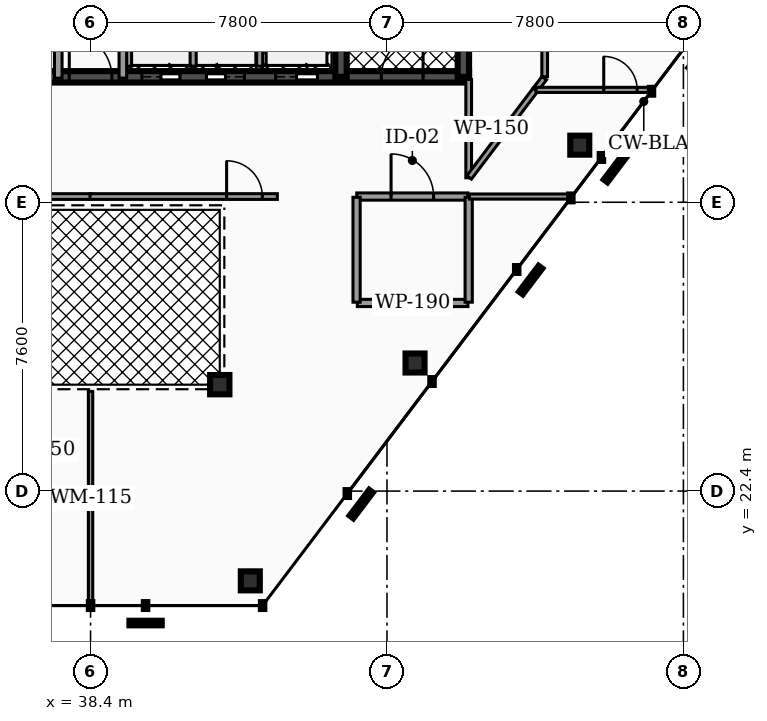
"""IFC4 building model, lengths in metres.
Left out: names, types, materials, properties, quantities, classifications, styles, units other than length and angle.
Written with IfcOpenShell. Run it as: python <this file> out.ifc"""

import sys

from ifc_helpers import new_model, si_unit, direction, frame, frame_2d, origin, origin_2d, place, context, subcontext, project, spatial, rectangle, hollow_rectangle, hollow_circle, extrude, element, fill, save


model = new_model("IFC4")
c1 = context("Model", 3, precision=1e-05, world=origin(), true_north=direction((0.0, 1.0)))
c2 = subcontext(c1, "Body", "Model", "MODEL_VIEW")
j1 = project(units=[si_unit("LENGTHUNIT", "METRE"), si_unit("PLANEANGLEUNIT", "RADIAN")], contexts=[c1])
p1 = place(None, origin())
s1 = spatial("IfcSite", under=j1, at=p1, CompositionType="ELEMENT")
p2 = place(p1, origin())
s2 = spatial("IfcBuilding", under=s1, at=p2, CompositionType="ELEMENT")
p3 = place(p2, frame((0.0, 0.0, 272.0)))
s3 = spatial("IfcBuildingStorey", under=s2, at=p3, CompositionType="ELEMENT", Elevation=272.0)
p4 = place(p3, frame((28.5, 33.3, 0.0), z_axis=(0.0, 0.0, 1.0), x_axis=(1.0, 0.0, 0.0)))
e1 = element("IfcWall", 1, at=p4, inside=s3, PredefinedType="SHEAR", context=c2, shape_type="SweptSolid", body=[
    extrude(rectangle(XDim=19.86, YDim=0.3, at=frame_2d((9.93, 0.0))), origin(), (0.0, 0.0, 1.0), 3.18),
])
p5 = place(p4, frame((3.93, 0.0, 0.0)))
e2 = element("IfcOpeningElement", 2, at=p5, cuts=e1, PredefinedType="OPENING", context=c2, shape_type="SweptSolid", body=[
    extrude(rectangle(XDim=1.1, YDim=2.15, at=frame_2d((0.55, 1.075))), frame((0.0, 0.16, 0.0), z_axis=(0.0, -1.0, 0.0), x_axis=(1.0, 0.0, 0.0)), (0.0, 0.0, 1.0), 0.32),
])
p6 = place(p4, frame((14.77, 0.0, 0.0)))
e3 = element("IfcOpeningElement", 3, at=p6, cuts=e1, PredefinedType="OPENING", context=c2, shape_type="SweptSolid", body=[
    extrude(rectangle(XDim=1.1, YDim=2.15, at=frame_2d((0.55, 1.075))), frame((0.0, 0.16, 0.0), z_axis=(0.0, -1.0, 0.0), x_axis=(1.0, 0.0, 0.0)), (0.0, 0.0, 1.0), 0.32),
])
p7 = place(p4, frame((11.25, 0.0, 0.0)))
e4 = element("IfcOpeningElement", 4, at=p7, cuts=e1, PredefinedType="OPENING", context=c2, shape_type="SweptSolid", body=[
    extrude(rectangle(XDim=1.0, YDim=2.1, at=frame_2d((0.5, 1.05))), frame((0.0, 0.16, 0.0), z_axis=(0.0, -1.0, 0.0), x_axis=(1.0, 0.0, 0.0)), (0.0, 0.0, 1.0), 0.32),
])
p8 = place(p4, frame((12.95, 0.0, 0.0)))
e5 = element("IfcOpeningElement", 5, at=p8, cuts=e1, PredefinedType="OPENING", context=c2, shape_type="SweptSolid", body=[
    extrude(rectangle(XDim=1.0, YDim=2.1, at=frame_2d((0.5, 1.05))), frame((0.0, 0.16, 0.0), z_axis=(0.0, -1.0, 0.0), x_axis=(1.0, 0.0, 0.0)), (0.0, 0.0, 1.0), 0.32),
])
p9 = place(p4, frame((5.85, 0.0, 0.0)))
e6 = element("IfcOpeningElement", 6, at=p9, cuts=e1, PredefinedType="OPENING", context=c2, shape_type="SweptSolid", body=[
    extrude(rectangle(XDim=1.0, YDim=2.1, at=frame_2d((0.5, 1.05))), frame((0.0, 0.16, 0.0), z_axis=(0.0, -1.0, 0.0), x_axis=(1.0, 0.0, 0.0)), (0.0, 0.0, 1.0), 0.32),
])
p10 = place(p4, frame((1.21, 0.0, 0.0)))
e7 = element("IfcOpeningElement", 7, at=p10, cuts=e1, PredefinedType="OPENING", context=c2, shape_type="SweptSolid", body=[
    extrude(rectangle(XDim=1.1, YDim=2.2, at=frame_2d((0.55, 1.1))), frame((0.0, 0.16, 0.0), z_axis=(0.0, -1.0, 0.0), x_axis=(1.0, 0.0, 0.0)), (0.0, 0.0, 1.0), 0.32),
])
p11 = place(p4, frame((9.34, 0.0, 0.0)))
e8 = element("IfcOpeningElement", 8, at=p11, cuts=e1, PredefinedType="OPENING", context=c2, shape_type="SweptSolid", body=[
    extrude(rectangle(XDim=1.12, YDim=2.05, at=frame_2d((0.56, 1.025))), frame((0.0, 0.16, 0.0), z_axis=(0.0, -1.0, 0.0), x_axis=(1.0, 0.0, 0.0)), (0.0, 0.0, 1.0), 0.32),
])
p12 = place(p4, frame((17.55, 0.0, 0.0)))
e9 = element("IfcOpeningElement", 9, at=p12, cuts=e1, PredefinedType="OPENING", context=c2, shape_type="SweptSolid", body=[
    extrude(rectangle(XDim=1.1, YDim=2.2, at=frame_2d((0.55, 1.1))), frame((0.0, 0.16, 0.0), z_axis=(0.0, -1.0, 0.0), x_axis=(1.0, 0.0, 0.0)), (0.0, 0.0, 1.0), 0.32),
])
for number, where, z_axis, x_axis in (
    (10, (44.99, 33.3, 0.0), (0.0, 0.0, 1.0), (0.0, 1.0, 0.0)),
    (11, (48.21, 33.3, 0.0), (0.0, 0.0, 1.0), (0.0, 1.0, 0.0)),
):
    element("IfcWall", number, at=place(p3, frame(where, z_axis=z_axis, x_axis=x_axis)), inside=s3, PredefinedType="SHEAR", context=c2, shape_type="SweptSolid", body=[
        extrude(rectangle(XDim=10.1, YDim=0.3, at=frame_2d((5.05, 0.0))), origin(), (0.0, 0.0, 1.0), 3.18),
    ])
for number, where, z_axis, x_axis in (
    (12, (42.604, 20.038, 0.0), (0.0, 0.0, 1.0), (1.0, 0.0, 0.0)),
    (13, (46.938, 25.77, 0.0), (0.0, 0.0, 1.0), (1.0, 0.0, 0.0)),
    (14, (51.273, 31.502, 0.0), (0.0, 0.0, 1.0), (1.0, 0.0, 0.0)),
):
    element("IfcColumn", number, at=place(p3, frame(where, z_axis=z_axis, x_axis=x_axis)), inside=s3, PredefinedType="COLUMN", context=c2, shape_type="SweptSolid", body=[
        extrude(hollow_rectangle(XDim=0.5, YDim=0.5, WallThickness=0.025, at=origin_2d()), origin(), (0.0, 0.0, 1.0), 3.18),
    ])
p13 = place(p3, frame((41.8, 25.2, 0.0), z_axis=(0.0, 0.0, 1.0), x_axis=(1.0, 0.0, 0.0)))
e15 = element("IfcColumn", 15, at=p13, inside=s3, PredefinedType="COLUMN", context=c2, shape_type="SweptSolid", body=[
    extrude(hollow_circle(Radius=0.254, WallThickness=0.02, at=origin_2d()), origin(), (0.0, 0.0, 1.0), 3.18),
])
p14 = place(p3, frame((42.85, 33.58, 0.0), z_axis=(0.0, 0.0, 1.0), x_axis=(0.0, 1.0, 0.0)))
e16 = element("IfcWall", 16, at=p14, inside=s3, PredefinedType="SOLIDWALL", context=c2, shape_type="SweptSolid", body=[
    extrude(rectangle(XDim=2.45, YDim=0.16, at=frame_2d((1.225, 0.0))), origin(), (0.0, 0.0, 1.0), 3.18),
])
for number, where, z_axis, x_axis in (
    (17, (39.4, 33.58, 0.0), (0.0, 0.0, 1.0), (0.0, 1.0, 0.0)),
    (18, (41.1, 33.58, 0.0), (0.0, 0.0, 1.0), (0.0, 1.0, 0.0)),
):
    element("IfcWall", number, at=place(p3, frame(where, z_axis=z_axis, x_axis=x_axis)), inside=s3, PredefinedType="SOLIDWALL", context=c2, shape_type="SweptSolid", body=[
        extrude(rectangle(XDim=2.25, YDim=0.16, at=frame_2d((1.125, 0.0))), origin(), (0.0, 0.0, 1.0), 3.18),
    ])
p15 = place(p3, frame((37.55, 33.265, 0.0), z_axis=(0.0, 0.0, 1.0), x_axis=(0.0, 1.0, 0.0)))
e19 = element("IfcWall", 19, at=p15, inside=s3, PredefinedType="PARTITIONING", context=c2, shape_type="SweptSolid", body=[
    extrude(rectangle(XDim=3.615, YDim=0.2, at=frame_2d((1.808, 0.0))), origin(), (0.0, 0.0, 1.0), 2.235),
])
p16 = place(p15, frame((1.367, 0.0, 0.0)))
e20 = element("IfcOpeningElement", 20, at=p16, cuts=e19, PredefinedType="OPENING", context=c2, shape_type="SweptSolid", body=[
    extrude(rectangle(XDim=0.88, YDim=2.05, at=frame_2d((0.44, 1.025))), frame((0.0, 0.11, 0.0), z_axis=(0.0, -1.0, 0.0), x_axis=(1.0, 0.0, 0.0)), (0.0, 0.0, 1.0), 0.22),
])
p17 = place(p3, frame((39.25, 33.265, 0.0), z_axis=(0.0, 0.0, 1.0), x_axis=(0.0, 1.0, 0.0)))
e21 = element("IfcWall", 21, at=p17, inside=s3, PredefinedType="PARTITIONING", context=c2, shape_type="SweptSolid", body=[
    extrude(rectangle(XDim=3.615, YDim=0.2, at=frame_2d((1.808, 0.0))), origin(), (0.0, 0.0, 1.0), 2.235),
])
p18 = place(p3, frame((45.405, 30.15, 0.0), z_axis=(0.0, 0.0, 1.0), x_axis=(1.0, 0.0, 0.0)))
e22 = element("IfcWall", 22, at=p18, inside=s3, PredefinedType="PARTITIONING", context=c2, shape_type="SweptSolid", body=[
    extrude(rectangle(XDim=2.925, YDim=0.19, at=frame_2d((1.462, 0.0))), origin(), (0.0, 0.0, 1.0), 2.235),
])
p19 = place(p18, frame((0.903, 0.0, 0.0)))
e23 = element("IfcOpeningElement", 23, at=p19, cuts=e22, PredefinedType="OPENING", context=c2, shape_type="SweptSolid", body=[
    extrude(rectangle(XDim=1.12, YDim=2.05, at=frame_2d((0.56, 1.025))), frame((0.0, 0.105, 0.0), z_axis=(0.0, -1.0, 0.0), x_axis=(1.0, 0.0, 0.0)), (0.0, 0.0, 1.0), 0.21),
])
p20 = place(p3, frame((48.35, 30.643, 0.0), z_axis=(0.0, 0.0, 1.0), x_axis=(0.0, 1.0, 0.0)))
e24 = element("IfcWall", 24, at=p20, inside=s3, PredefinedType="PARTITIONING", context=c2, shape_type="SweptSolid", body=[
    extrude(rectangle(XDim=2.587, YDim=0.15, at=frame_2d((1.294, 0.0))), origin(), (0.0, 0.0, 1.0), 2.235),
])
p21 = place(p3, frame((33.485, 30.15, 0.0), z_axis=(0.0, 0.0, 1.0), x_axis=(1.0, 0.0, 0.0)))
e25 = element("IfcWall", 25, at=p21, inside=s3, PredefinedType="PARTITIONING", context=c2, shape_type="SweptSolid", body=[
    extrude(rectangle(XDim=4.93, YDim=0.15, at=frame_2d((2.465, 0.0))), origin(), (0.0, 0.0, 1.0), 2.235),
])
p22 = place(p21, frame((0.395, 0.0, 0.0)))
e26 = element("IfcOpeningElement", 26, at=p22, cuts=e25, PredefinedType="OPENING", context=c2, shape_type="SweptSolid", body=[
    extrude(rectangle(XDim=0.94, YDim=2.05, at=frame_2d((0.47, 1.025))), frame((0.0, 0.085, 0.0), z_axis=(0.0, -1.0, 0.0), x_axis=(1.0, 0.0, 0.0)), (0.0, 0.0, 1.0), 0.17),
])
p23 = place(p3, frame((38.385, 30.15, 0.0), z_axis=(0.0, 0.0, 1.0), x_axis=(1.0, 0.0, 0.0)))
e27 = element("IfcWall", 27, at=p23, inside=s3, PredefinedType="PARTITIONING", context=c2, shape_type="SweptSolid", body=[
    extrude(rectangle(XDim=4.93, YDim=0.15, at=frame_2d((2.465, 0.0))), origin(), (0.0, 0.0, 1.0), 2.235),
])
p24 = place(p23, frame((3.595, 0.0, 0.0)))
e28 = element("IfcOpeningElement", 28, at=p24, cuts=e27, PredefinedType="OPENING", context=c2, shape_type="SweptSolid", body=[
    extrude(rectangle(XDim=0.94, YDim=2.05, at=frame_2d((0.47, 1.025))), frame((0.0, 0.085, 0.0), z_axis=(0.0, -1.0, 0.0), x_axis=(1.0, 0.0, 0.0)), (0.0, 0.0, 1.0), 0.17),
])
p25 = place(p3, frame((45.42, 27.35, 0.0), z_axis=(0.0, 0.0, 1.0), x_axis=(1.0, 0.0, 0.0)))
e29 = element("IfcWall", 29, at=p25, inside=s3, PredefinedType="PARTITIONING", context=c2, shape_type="SweptSolid", body=[
    extrude(rectangle(XDim=2.91, YDim=0.19, at=frame_2d((1.455, 0.0))), origin(), (0.0, 0.0, 1.0), 2.235),
])
for number, where, z_axis, x_axis in (
    (30, (45.4, 27.37, 0.0), (0.0, 0.0, 1.0), (0.0, 1.0, 0.0)),
    (31, (48.35, 27.37, 0.0), (0.0, 0.0, 1.0), (0.0, 1.0, 0.0)),
):
    element("IfcWall", number, at=place(p3, frame(where, z_axis=z_axis, x_axis=x_axis)), inside=s3, PredefinedType="PARTITIONING", context=c2, shape_type="SweptSolid", body=[
        extrude(rectangle(XDim=2.76, YDim=0.19, at=frame_2d((1.38, 0.0))), origin(), (0.0, 0.0, 1.0), 2.235),
    ])
p26 = place(p3, frame((50.35, 33.302, 0.0), z_axis=(0.0, 0.0, 1.0), x_axis=(0.0, 1.0, 0.0)))
e32 = element("IfcWall", 32, at=p26, inside=s3, PredefinedType="PARTITIONING", context=c2, shape_type="SweptSolid", body=[
    extrude(rectangle(XDim=10.248, YDim=0.15, at=frame_2d((5.124, 0.0))), origin(), (0.0, 0.0, 1.0), 2.235),
])
p27 = place(p26, frame((4.654, 0.0, 0.0)))
e33 = element("IfcOpeningElement", 33, at=p27, cuts=e32, PredefinedType="OPENING", context=c2, shape_type="SweptSolid", body=[
    extrude(rectangle(XDim=0.94, YDim=2.05, at=frame_2d((0.47, 1.025))), frame((0.0, 0.085, 0.0), z_axis=(0.0, -1.0, 0.0), x_axis=(1.0, 0.0, 0.0)), (0.0, 0.0, 1.0), 0.17),
])
p28 = place(p3, frame((50.107, 32.96, 0.0), z_axis=(0.0, 0.0, 1.0), x_axis=(0.602950173728, 0.797778846549, 0.0)))
e34 = element("IfcWall", 34, at=p28, inside=s3, PredefinedType="PARTITIONING", context=c2, shape_type="SweptSolid", body=[
    extrude(rectangle(XDim=0.384, YDim=0.15, at=frame_2d((0.192, 0.0))), origin(), (0.0, 0.0, 1.0), 2.235),
])
p29 = place(p3, frame((48.362, 30.654, 0.0), z_axis=(0.0, 0.0, 1.0), x_axis=(0.603189668488, 0.79759778324, 0.0)))
e35 = element("IfcWall", 35, at=p29, inside=s3, PredefinedType="PARTITIONING", context=c2, shape_type="SweptSolid", body=[
    extrude(rectangle(XDim=2.886, YDim=0.15, at=frame_2d((1.443, 0.0))), origin(), (0.0, 0.0, 1.0), 2.235),
])
p30 = place(p3, frame((38.4, 19.403, 0.0), z_axis=(0.0, 0.0, 1.0), x_axis=(0.0, 1.0, 0.0)))
e36 = element("IfcWall", 36, at=p30, inside=s3, PredefinedType="MOVABLE", context=c2, shape_type="SweptSolid", body=[
    extrude(rectangle(XDim=5.617, YDim=0.115, at=frame_2d((2.809, 0.0))), origin(), (0.0, 0.0, 1.0), 2.235),
])
p31 = place(p3, frame((48.37, 30.15, 0.0), z_axis=(0.0, 0.0, 1.0), x_axis=(1.0, 0.0, 0.0)))
e37 = element("IfcWall", 37, at=p31, inside=s3, PredefinedType="PARTITIONING", context=c2, shape_type="SweptSolid", body=[
    extrude(rectangle(XDim=2.68, YDim=0.135, at=frame_2d((1.34, 0.0))), origin(), (0.0, 0.0, 1.0), 2.235),
])
p32 = place(p3, frame((50.124, 32.956, 0.0), z_axis=(0.0, 0.0, 1.0), x_axis=(1.0, 0.0, 0.0)))
e38 = element("IfcWall", 38, at=p32, inside=s3, PredefinedType="PARTITIONING", context=c2, shape_type="SweptSolid", body=[
    extrude(rectangle(XDim=3.049, YDim=0.135, at=frame_2d((1.525, 0.0))), origin(), (0.0, 0.0, 1.0), 2.235),
])
p33 = place(p32, frame((1.78, 0.0, 0.0)))
e39 = element("IfcOpeningElement", 39, at=p33, cuts=e38, PredefinedType="OPENING", context=c2, shape_type="SweptSolid", body=[
    extrude(rectangle(XDim=0.88, YDim=2.05, at=frame_2d((0.44, 1.025))), frame((0.0, 0.077, 0.0), z_axis=(0.0, -1.0, 0.0), x_axis=(1.0, 0.0, 0.0)), (0.0, 0.0, 1.0), 0.155),
])
p34 = place(p6, origin())
e40 = element("IfcDoor", 40, at=p34, inside=s3, OperationType="SLIDING_TO_RIGHT", PredefinedType="DOOR", context=c2, shape_type="SweptSolid", body=[
    extrude(rectangle(XDim=1.1, YDim=2.15, at=frame_2d((0.55, 1.075))), frame((0.0, 0.025, 0.0), z_axis=(0.0, -1.0, 0.0), x_axis=(1.0, 0.0, 0.0)), (0.0, 0.0, 1.0), 0.05),
])
fill(e3, e40)
p35 = place(p7, origin())
e41 = element("IfcDoor", 41, at=p35, inside=s3, OperationType="SLIDING_TO_RIGHT", PredefinedType="DOOR", context=c2, shape_type="SweptSolid", body=[
    extrude(rectangle(XDim=1.0, YDim=2.1, at=frame_2d((0.5, 1.05))), frame((0.0, 0.025, 0.0), z_axis=(0.0, -1.0, 0.0), x_axis=(1.0, 0.0, 0.0)), (0.0, 0.0, 1.0), 0.05),
])
fill(e4, e41)
p36 = place(p8, origin())
e42 = element("IfcDoor", 42, at=p36, inside=s3, OperationType="SLIDING_TO_LEFT", PredefinedType="DOOR", context=c2, shape_type="SweptSolid", body=[
    extrude(rectangle(XDim=1.0, YDim=2.1, at=frame_2d((0.5, 1.05))), frame((0.0, 0.025, 0.0), z_axis=(0.0, -1.0, 0.0), x_axis=(1.0, 0.0, 0.0)), (0.0, 0.0, 1.0), 0.05),
])
fill(e5, e42)
p37 = place(p11, origin())
e43 = element("IfcDoor", 43, at=p37, inside=s3, OperationType="SINGLE_SWING_LEFT", PredefinedType="DOOR", context=c2, shape_type="SweptSolid", body=[
    extrude(rectangle(XDim=1.12, YDim=2.05, at=frame_2d((0.56, 1.025))), frame((0.0, 0.025, 0.0), z_axis=(0.0, -1.0, 0.0), x_axis=(1.0, 0.0, 0.0)), (0.0, 0.0, 1.0), 0.05),
])
fill(e8, e43)
p38 = place(p12, origin())
e44 = element("IfcDoor", 44, at=p38, inside=s3, OperationType="SINGLE_SWING_RIGHT", PredefinedType="DOOR", context=c2, shape_type="SweptSolid", body=[
    extrude(rectangle(XDim=1.1, YDim=2.2, at=frame_2d((0.55, 1.1))), frame((0.0, 0.025, 0.0), z_axis=(0.0, -1.0, 0.0), x_axis=(1.0, 0.0, 0.0)), (0.0, 0.0, 1.0), 0.05),
])
fill(e9, e44)
p39 = place(p19, origin())
e45 = element("IfcDoor", 45, at=p39, inside=s3, OperationType="SINGLE_SWING_LEFT", PredefinedType="DOOR", context=c2, shape_type="SweptSolid", body=[
    extrude(rectangle(XDim=1.12, YDim=2.05, at=frame_2d((0.56, 1.025))), frame((0.0, 0.025, 0.0), z_axis=(0.0, -1.0, 0.0), x_axis=(1.0, 0.0, 0.0)), (0.0, 0.0, 1.0), 0.05),
])
fill(e23, e45)
p40 = place(p24, origin())
e46 = element("IfcDoor", 46, at=p40, inside=s3, OperationType="SINGLE_SWING_LEFT", PredefinedType="DOOR", context=c2, shape_type="SweptSolid", body=[
    extrude(rectangle(XDim=0.94, YDim=2.05, at=frame_2d((0.47, 1.025))), frame((0.0, 0.025, 0.0), z_axis=(0.0, -1.0, 0.0), x_axis=(1.0, 0.0, 0.0)), (0.0, 0.0, 1.0), 0.05),
])
fill(e28, e46)
p41 = place(p33, origin())
e47 = element("IfcDoor", 47, at=p41, inside=s3, OperationType="SINGLE_SWING_LEFT", PredefinedType="DOOR", context=c2, shape_type="SweptSolid", body=[
    extrude(rectangle(XDim=0.88, YDim=2.05, at=frame_2d((0.44, 1.025))), frame((0.0, 0.025, 0.0), z_axis=(0.0, -1.0, 0.0), x_axis=(1.0, 0.0, 0.0)), (0.0, 0.0, 1.0), 0.05),
])
fill(e39, e47)
save(model, sys.argv[1])
